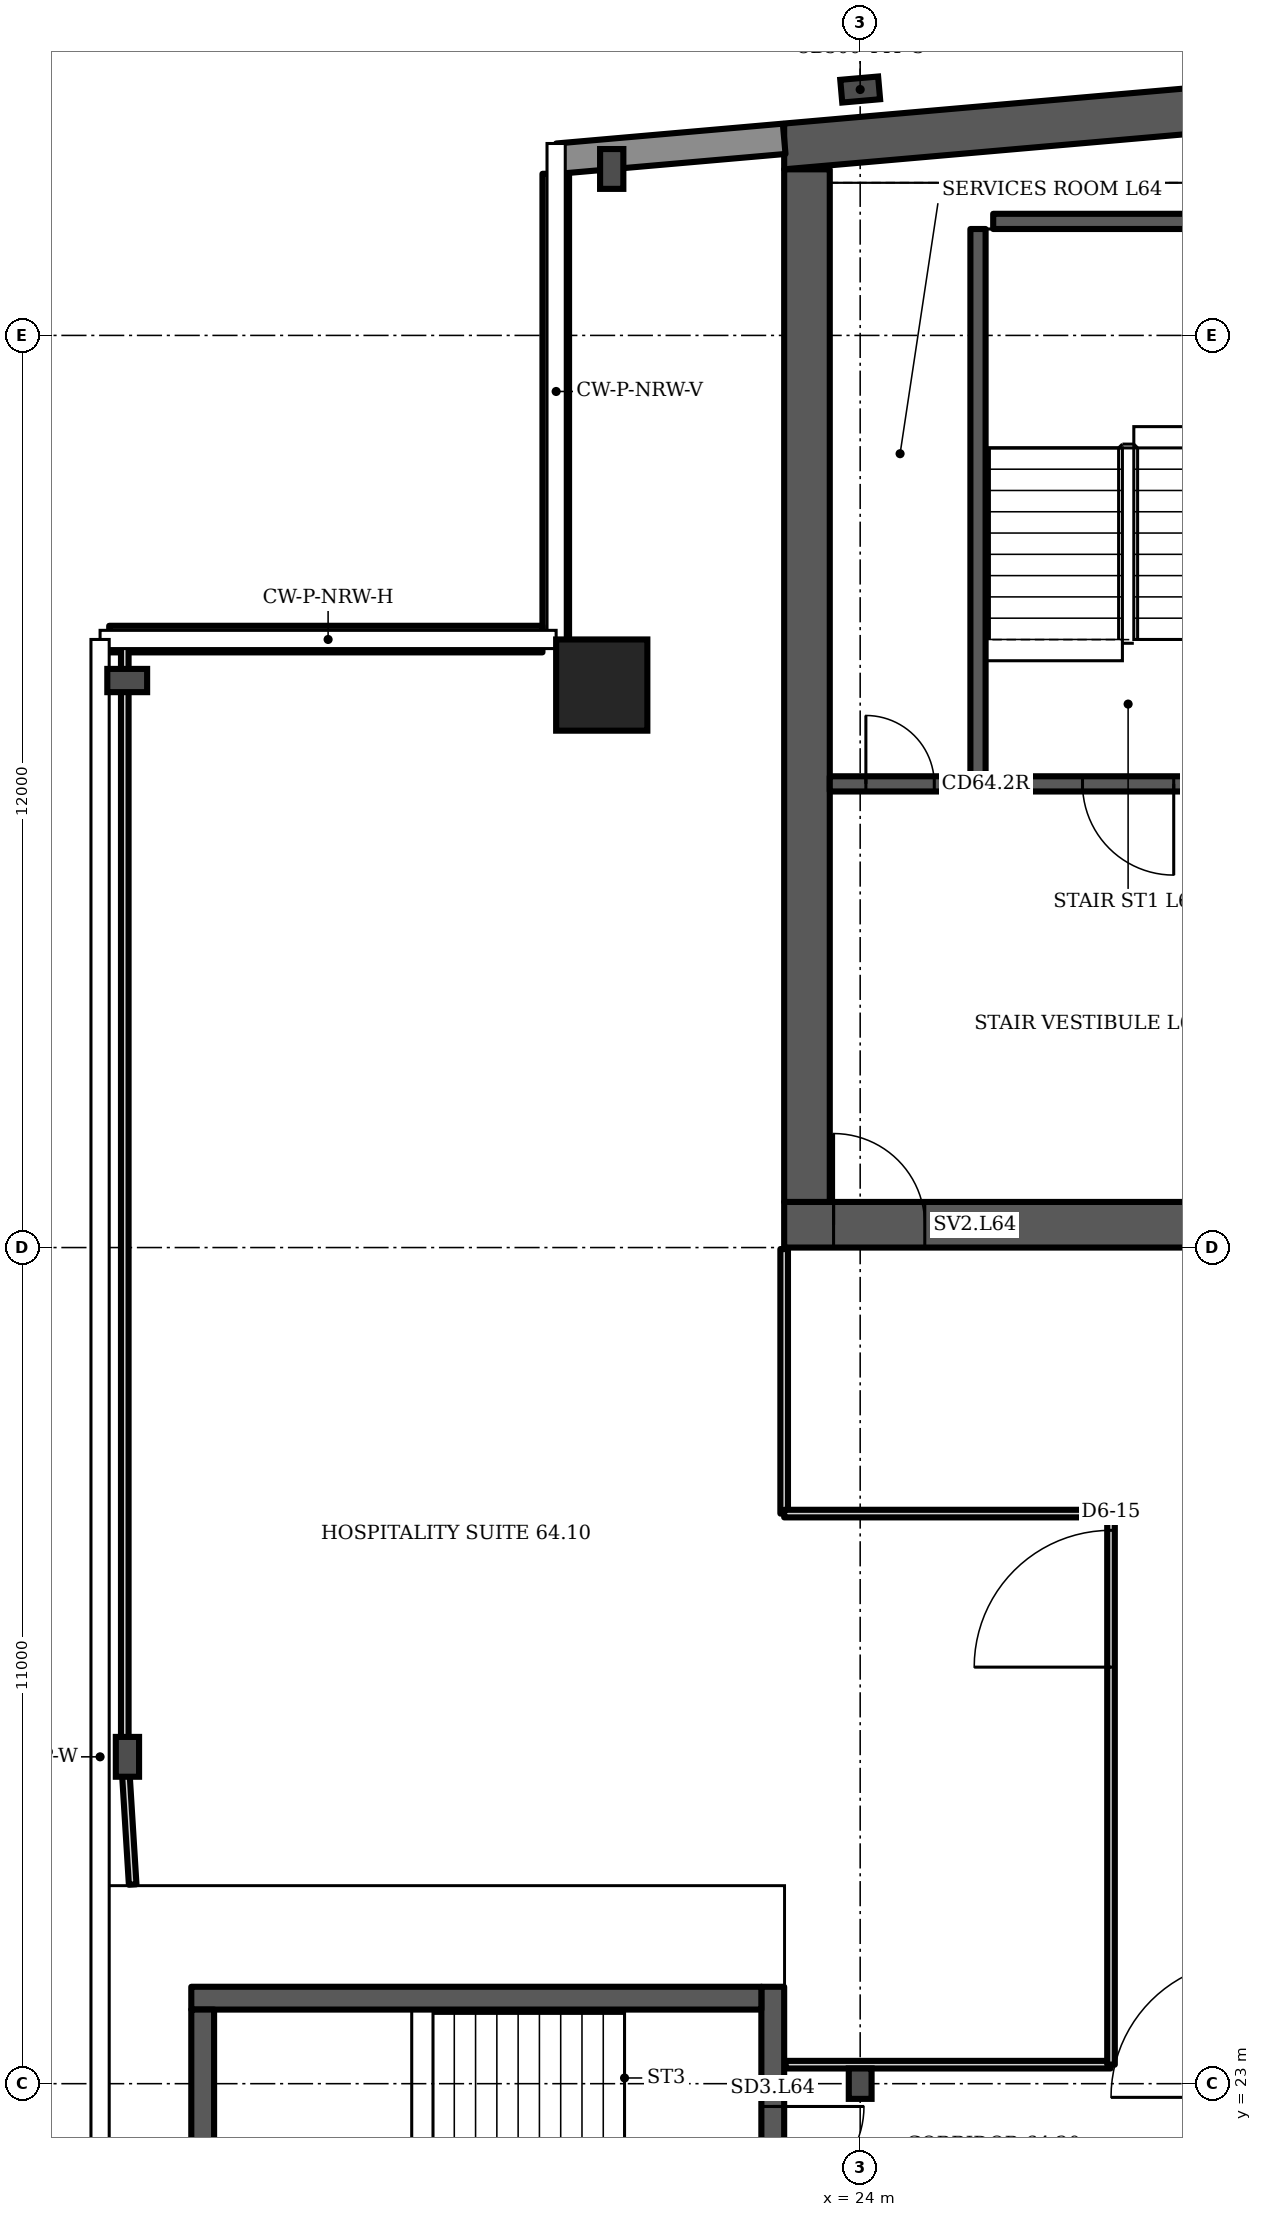
"""IFC4 building model, lengths in metres.
Left out: names, types, materials, properties, quantities, classifications, styles, units other than length and angle.
Written with IfcOpenShell. Run it as: python <this file> out.ifc"""

import sys

from ifc_helpers import new_model, si_unit, direction, frame, frame_2d, origin, origin_2d, place, context, subcontext, project, spatial, polyline, rectangle, i_section, outline, extrude, element, fill, save


model = new_model("IFC4")
c1 = context("Model", 3, precision=1e-05, world=origin(), true_north=direction((0.0, 1.0)))
c2 = subcontext(c1, "Body", "Model", "MODEL_VIEW")
j1 = project(units=[si_unit("LENGTHUNIT", "METRE"), si_unit("PLANEANGLEUNIT", "RADIAN")], contexts=[c1])
p1 = place(None, origin())
s1 = spatial("IfcSite", under=j1, at=p1, CompositionType="ELEMENT")
p2 = place(p1, origin())
s2 = spatial("IfcBuilding", under=s1, at=p2, CompositionType="ELEMENT")
p3 = place(p2, frame((0.0, 0.0, 253.9)))
s3 = spatial("IfcBuildingStorey", under=s2, at=p3, CompositionType="ELEMENT", Elevation=253.9)
p4 = place(p3, origin())
e1 = element("IfcWall", 1, at=p4, inside=s3, PredefinedType="SHEAR", context=c2, shape_type="SweptSolid", body=[
    extrude(outline(polyline([(23.0, 48.185), (40.5, 49.716), (58.0, 48.185), (58.0, 48.787), (40.5, 50.318), (23.0, 48.787), (23.0, 48.185)])), origin(), (0.0, 0.0, 1.0), 3.6),
])
p5 = place(p3, frame((23.0, 34.3, 0.0), z_axis=(0.0, 0.0, 1.0), x_axis=(1.0, 0.0, 0.0)))
e2 = element("IfcWall", 2, at=p5, inside=s3, PredefinedType="SHEAR", context=c2, shape_type="SweptSolid", body=[
    extrude(rectangle(XDim=35.0, YDim=0.6, at=frame_2d((17.5, 0.0))), origin(), (0.0, 0.0, 1.0), 3.6),
])
p6 = place(p5, frame((0.65, 0.0, 0.0)))
e3 = element("IfcOpeningElement", 3, at=p6, cuts=e2, PredefinedType="OPENING", context=c2, shape_type="SweptSolid", body=[
    extrude(rectangle(XDim=1.2, YDim=2.1, at=frame_2d((0.6, 1.05))), frame((0.0, 0.31, 0.0), z_axis=(0.0, -1.0, 0.0), x_axis=(1.0, 0.0, 0.0)), (0.0, 0.0, 1.0), 0.62),
])
p7 = place(p5, frame((7.717, 0.0, 0.0)))
e4 = element("IfcOpeningElement", 4, at=p7, cuts=e2, PredefinedType="OPENING", context=c2, shape_type="SweptSolid", body=[
    extrude(rectangle(XDim=1.1, YDim=2.1, at=frame_2d((0.55, 1.05))), frame((0.0, 0.31, 0.0), z_axis=(0.0, -1.0, 0.0), x_axis=(1.0, 0.0, 0.0)), (0.0, 0.0, 1.0), 0.62),
])
p8 = place(p5, frame((12.183, 0.0, 0.0)))
e5 = element("IfcOpeningElement", 5, at=p8, cuts=e2, PredefinedType="OPENING", context=c2, shape_type="SweptSolid", body=[
    extrude(rectangle(XDim=1.1, YDim=2.1, at=frame_2d((0.55, 1.05))), frame((0.0, 0.31, 0.0), z_axis=(0.0, -1.0, 0.0), x_axis=(1.0, 0.0, 0.0)), (0.0, 0.0, 1.0), 0.62),
])
p9 = place(p5, frame((9.8, 0.0, 0.0)))
e6 = element("IfcOpeningElement", 6, at=p9, cuts=e2, PredefinedType="OPENING", context=c2, shape_type="SweptSolid", body=[
    extrude(rectangle(XDim=1.4, YDim=2.1, at=frame_2d((0.7, 1.05))), frame((0.0, 0.31, 0.0), z_axis=(0.0, -1.0, 0.0), x_axis=(1.0, 0.0, 0.0)), (0.0, 0.0, 1.0), 0.62),
])
p10 = place(p5, frame((14.717, 0.0, 0.0)))
e7 = element("IfcOpeningElement", 7, at=p10, cuts=e2, PredefinedType="OPENING", context=c2, shape_type="SweptSolid", body=[
    extrude(rectangle(XDim=1.1, YDim=2.1, at=frame_2d((0.55, 1.05))), frame((0.0, 0.31, 0.0), z_axis=(0.0, -1.0, 0.0), x_axis=(1.0, 0.0, 0.0)), (0.0, 0.0, 1.0), 0.62),
])
p11 = place(p5, frame((16.95, 0.0, 0.0)))
e8 = element("IfcOpeningElement", 8, at=p11, cuts=e2, PredefinedType="OPENING", context=c2, shape_type="SweptSolid", body=[
    extrude(rectangle(XDim=1.1, YDim=2.1, at=frame_2d((0.55, 1.05))), frame((0.0, 0.31, 0.0), z_axis=(0.0, -1.0, 0.0), x_axis=(1.0, 0.0, 0.0)), (0.0, 0.0, 1.0), 0.62),
])
p12 = place(p5, frame((19.183, 0.0, 0.0)))
e9 = element("IfcOpeningElement", 9, at=p12, cuts=e2, PredefinedType="OPENING", context=c2, shape_type="SweptSolid", body=[
    extrude(rectangle(XDim=1.1, YDim=2.1, at=frame_2d((0.55, 1.05))), frame((0.0, 0.31, 0.0), z_axis=(0.0, -1.0, 0.0), x_axis=(1.0, 0.0, 0.0)), (0.0, 0.0, 1.0), 0.62),
])
p13 = place(p5, frame((26.15, 0.0, 0.0)))
e10 = element("IfcOpeningElement", 10, at=p13, cuts=e2, PredefinedType="OPENING", context=c2, shape_type="SweptSolid", body=[
    extrude(rectangle(XDim=1.2, YDim=2.1, at=frame_2d((0.6, 1.05))), frame((0.0, 0.31, 0.0), z_axis=(0.0, -1.0, 0.0), x_axis=(1.0, 0.0, 0.0)), (0.0, 0.0, 1.0), 0.62),
])
p14 = place(p5, frame((28.767, 0.0, 0.0)))
e11 = element("IfcOpeningElement", 11, at=p14, cuts=e2, PredefinedType="OPENING", context=c2, shape_type="SweptSolid", body=[
    extrude(rectangle(XDim=1.0, YDim=2.1, at=frame_2d((0.5, 1.05))), frame((0.0, 0.31, 0.0), z_axis=(0.0, -1.0, 0.0), x_axis=(1.0, 0.0, 0.0)), (0.0, 0.0, 1.0), 0.62),
])
p15 = place(p5, frame((33.083, 0.0, 0.0)))
e12 = element("IfcOpeningElement", 12, at=p15, cuts=e2, PredefinedType="OPENING", context=c2, shape_type="SweptSolid", body=[
    extrude(rectangle(XDim=1.0, YDim=2.1, at=frame_2d((0.5, 1.05))), frame((0.0, 0.31, 0.0), z_axis=(0.0, -1.0, 0.0), x_axis=(1.0, 0.0, 0.0)), (0.0, 0.0, 1.0), 0.62),
])
p16 = place(p5, frame((30.8, 0.0, 0.0)))
e13 = element("IfcOpeningElement", 13, at=p16, cuts=e2, PredefinedType="OPENING", context=c2, shape_type="SweptSolid", body=[
    extrude(rectangle(XDim=1.4, YDim=2.1, at=frame_2d((0.7, 1.05))), frame((0.0, 0.31, 0.0), z_axis=(0.0, -1.0, 0.0), x_axis=(1.0, 0.0, 0.0)), (0.0, 0.0, 1.0), 0.62),
])
p17 = place(p3, frame((23.3, 34.6, 0.0), z_axis=(0.0, 0.0, 1.0), x_axis=(0.0, 1.0, 0.0)))
e14 = element("IfcWall", 14, at=p17, inside=s3, PredefinedType="SHEAR", context=c2, shape_type="SweptSolid", body=[
    extrude(rectangle(XDim=13.585, YDim=0.6, at=frame_2d((6.792, 0.0))), origin(), (0.0, 0.0, 1.0), 3.6),
])
p18 = place(p3, frame((20.6, 41.4, 0.0), z_axis=(0.0, 0.0, 1.0), x_axis=(1.0, 0.0, 0.0)))
e15 = element("IfcColumn", 15, at=p18, inside=s3, PredefinedType="COLUMN", context=c2, shape_type="SweptSolid", body=[
    extrude(rectangle(XDim=1.2, YDim=1.2, at=origin_2d()), origin(), (0.0, 0.0, 1.0), 3.6),
])
for number, where, z_axis, x_axis in (
    (16, (20.731, 48.19, 0.0), (0.0, 0.0, 1.0), (-1.0, 0.0, 0.0)),
    (17, (14.357, 41.46, 0.0), (0.0, 0.0, 1.0), (0.0, 1.0, 0.0)),
    (18, (14.36, 27.3, 0.0), (0.0, 0.0, 1.0), (-1.0, 0.0, 0.0)),
):
    element("IfcColumn", number, at=place(p3, frame(where, z_axis=z_axis, x_axis=x_axis)), inside=s3, PredefinedType="COLUMN", context=c2, shape_type="SweptSolid", body=[
        extrude(i_section(OverallWidth=0.306, OverallDepth=0.524, WebThickness=0.021, FlangeThickness=0.04, FilletRadius=0.027, at=origin_2d()), origin(), (0.0, 0.0, 1.0), 3.6),
    ])
p19 = place(p3, frame((24.0, 23.0, 0.0), z_axis=(0.0, 0.0, 1.0), x_axis=(1.0, 0.0, 0.0)))
e19 = element("IfcColumn", 19, at=p19, inside=s3, PredefinedType="COLUMN", context=c2, shape_type="SweptSolid", body=[
    extrude(i_section(OverallWidth=0.3, OverallDepth=0.4, WebThickness=0.013, FlangeThickness=0.024, FilletRadius=0.027, at=origin_2d()), origin(), (0.0, 0.0, 1.0), 3.6),
])
p20 = place(p3, frame((24.0, 49.235, 0.0), z_axis=(0.0, 0.0, 1.0), x_axis=(-0.087156, 0.996197, 0.0)))
e20 = element("IfcColumn", 20, at=p20, inside=s3, PredefinedType="COLUMN", context=c2, shape_type="SweptSolid", body=[
    extrude(i_section(OverallWidth=0.3, OverallDepth=0.5, WebThickness=0.014, FlangeThickness=0.028, FilletRadius=0.027, at=origin_2d()), origin(), (0.0, 0.0, 1.0), 3.6),
])
p21 = place(p3, frame((23.0, 48.587, 0.0), z_axis=(0.0, 0.0, 1.0), x_axis=(-0.996194, -0.087168, 0.0)))
e21 = element("IfcWall", 21, at=p21, inside=s3, PredefinedType="SOLIDWALL", context=c2, shape_type="SweptSolid", body=[
    extrude(rectangle(XDim=2.994, YDim=0.4, at=frame_2d((1.497, 0.0))), origin(), (0.0, 0.0, 1.0), 3.2),
])
p22 = place(p3, frame((19.995, 48.126, 0.0), z_axis=(0.0, 0.0, 1.0), x_axis=(0.0, -1.0, 0.0)))
e22 = element("IfcWall", 22, at=p22, inside=s3, PredefinedType="SOLIDWALL", context=c2, shape_type="SweptSolid", body=[
    extrude(rectangle(XDim=6.126, YDim=0.35, at=frame_2d((3.063, 0.0))), origin(), (0.0, 0.0, 1.0), 1.0),
])
p23 = place(p3, frame((19.82, 42.005, 0.0), z_axis=(0.0, 0.0, 1.0), x_axis=(-1.0, 0.0, 0.0)))
e23 = element("IfcWall", 23, at=p23, inside=s3, PredefinedType="SOLIDWALL", context=c2, shape_type="SweptSolid", body=[
    extrude(rectangle(XDim=5.7, YDim=0.35, at=frame_2d((2.85, 0.0))), origin(), (0.0, 0.0, 1.0), 1.0),
])
p24 = place(p3, frame((23.6, 40.1, 0.0), z_axis=(0.0, 0.0, 1.0), x_axis=(1.0, 0.0, 0.0)))
e24 = element("IfcWall", 24, at=p24, inside=s3, PredefinedType="SHEAR", context=c2, shape_type="SweptSolid", body=[
    extrude(rectangle(XDim=6.1, YDim=0.2, at=frame_2d((3.05, 0.0))), origin(), (0.0, 0.0, 1.0), 3.2),
])
p25 = place(p24, frame((3.325, 0.0, 0.0)))
e25 = element("IfcOpeningElement", 25, at=p25, cuts=e24, PredefinedType="OPENING", context=c2, shape_type="SweptSolid", body=[
    extrude(rectangle(XDim=1.2, YDim=2.1, at=frame_2d((0.6, 1.05))), frame((0.0, 0.11, 0.0), z_axis=(0.0, -1.0, 0.0), x_axis=(1.0, 0.0, 0.0)), (0.0, 0.0, 1.0), 0.22),
])
p26 = place(p24, frame((0.475, 0.0, 0.0)))
e26 = element("IfcOpeningElement", 26, at=p26, cuts=e24, PredefinedType="OPENING", context=c2, shape_type="SweptSolid", body=[
    extrude(rectangle(XDim=0.9, YDim=2.1, at=frame_2d((0.45, 1.05))), frame((0.0, 0.11, 0.0), z_axis=(0.0, -1.0, 0.0), x_axis=(1.0, 0.0, 0.0)), (0.0, 0.0, 1.0), 0.22),
])
p27 = place(p3, frame((25.55, 40.2, 0.0), z_axis=(0.0, 0.0, 1.0), x_axis=(0.0, 1.0, 0.0)))
e27 = element("IfcWall", 27, at=p27, inside=s3, PredefinedType="SHEAR", context=c2, shape_type="SweptSolid", body=[
    extrude(rectangle(XDim=7.2, YDim=0.2, at=frame_2d((3.6, 0.0))), origin(), (0.0, 0.0, 1.0), 3.2),
])
p28 = place(p3, frame((25.75, 47.5, 0.0), z_axis=(0.0, 0.0, 1.0), x_axis=(1.0, 0.0, 0.0)))
e28 = element("IfcWall", 28, at=p28, inside=s3, PredefinedType="SHEAR", context=c2, shape_type="SweptSolid", body=[
    extrude(rectangle(XDim=3.95, YDim=0.2, at=frame_2d((1.975, 0.0))), origin(), (0.0, 0.0, 1.0), 3.2),
])
p29 = place(p3, frame((22.85, 19.925, 0.0), z_axis=(0.0, 0.0, 1.0), x_axis=(0.0, 1.0, 0.0)))
e29 = element("IfcWall", 29, at=p29, inside=s3, PredefinedType="SHEAR", context=c2, shape_type="SweptSolid", body=[
    extrude(rectangle(XDim=4.35, YDim=0.3, at=frame_2d((2.175, 0.0))), origin(), (0.0, 0.0, 1.0), 3.2),
])
p30 = place(p29, frame((1.575, 0.0, 0.0)))
e30 = element("IfcOpeningElement", 30, at=p30, cuts=e29, PredefinedType="OPENING", context=c2, shape_type="SweptSolid", body=[
    extrude(rectangle(XDim=1.2, YDim=2.1, at=frame_2d((0.6, 1.05))), frame((0.0, 0.16, 0.0), z_axis=(0.0, -1.0, 0.0), x_axis=(1.0, 0.0, 0.0)), (0.0, 0.0, 1.0), 0.32),
])
p31 = place(p3, frame((14.325, 27.3, 0.0), z_axis=(0.0, 0.0, 1.0), x_axis=(0.0, 1.0, 0.0)))
e31 = element("IfcWall", 31, at=p31, inside=s3, PredefinedType="PARTITIONING", context=c2, shape_type="SweptSolid", body=[
    extrude(rectangle(XDim=14.68, YDim=0.1, at=frame_2d((7.34, 0.0))), origin(), (0.0, 0.0, 1.0), 2.58),
])
p32 = place(p3, frame((14.429, 25.62, 0.0), z_axis=(0.0, 0.0, 1.0), x_axis=(-0.061647, 0.998101, 0.0)))
e32 = element("IfcWall", 32, at=p32, inside=s3, PredefinedType="PARTITIONING", context=c2, shape_type="SweptSolid", body=[
    extrude(rectangle(XDim=1.683, YDim=0.1, at=frame_2d((0.842, 0.0))), origin(), (0.0, 0.0, 1.0), 2.58),
])
p33 = place(p3, frame((23.0, 30.5, 0.0), z_axis=(0.0, 0.0, 1.0), x_axis=(0.0, 1.0, 0.0)))
e33 = element("IfcWall", 33, at=p33, inside=s3, PredefinedType="PARTITIONING", context=c2, shape_type="SweptSolid", body=[
    extrude(rectangle(XDim=3.48, YDim=0.1, at=frame_2d((1.74, 0.0))), origin(), (0.0, 0.0, 1.0), 3.2),
])
p34 = place(p3, frame((23.0, 30.5, 0.0), z_axis=(0.0, 0.0, 1.0), x_axis=(1.0, 0.0, 0.0)))
e34 = element("IfcWall", 34, at=p34, inside=s3, PredefinedType="PARTITIONING", context=c2, shape_type="SweptSolid", body=[
    extrude(rectangle(XDim=4.3, YDim=0.1, at=frame_2d((2.15, 0.0))), origin(), (0.0, 0.0, 1.0), 3.2),
])
p35 = place(p3, frame((23.02, 23.25, 0.0), z_axis=(0.0, 0.0, 1.0), x_axis=(1.0, 0.0, 0.0)))
e35 = element("IfcWall", 35, at=p35, inside=s3, PredefinedType="PARTITIONING", context=c2, shape_type="SweptSolid", body=[
    extrude(rectangle(XDim=4.275, YDim=0.1, at=frame_2d((2.137, 0.0))), origin(), (0.0, 0.0, 1.0), 3.2),
])
p36 = place(p3, frame((27.3, 23.25, 0.0), z_axis=(0.0, 0.0, 1.0), x_axis=(0.0, 1.0, 0.0)))
e36 = element("IfcWall", 36, at=p36, inside=s3, PredefinedType="PARTITIONING", context=c2, shape_type="SweptSolid", body=[
    extrude(rectangle(XDim=7.25, YDim=0.1, at=frame_2d((3.625, 0.0))), origin(), (0.0, 0.0, 1.0), 3.2),
])
p37 = place(p36, frame((5.23, 0.0, 0.0)))
e37 = element("IfcOpeningElement", 37, at=p37, cuts=e36, PredefinedType="OPENING", context=c2, shape_type="SweptSolid", body=[
    extrude(rectangle(XDim=1.8, YDim=2.1, at=frame_2d((0.9, 1.05))), frame((0.0, 0.06, 0.0), z_axis=(0.0, -1.0, 0.0), x_axis=(1.0, 0.0, 0.0)), (0.0, 0.0, 1.0), 0.12),
])
p38 = place(p3, frame((15.2, 24.125, 0.0), z_axis=(0.0, 0.0, 1.0), x_axis=(1.0, 0.0, 0.0)))
e38 = element("IfcWall", 38, at=p38, inside=s3, PredefinedType="SHEAR", context=c2, shape_type="SweptSolid", body=[
    extrude(rectangle(XDim=7.5, YDim=0.3, at=frame_2d((3.75, 0.0))), origin(), (0.0, 0.0, 1.0), 3.2),
])
p39 = place(p3, frame((15.35, 20.225, 0.0), z_axis=(0.0, 0.0, 1.0), x_axis=(0.0, 1.0, 0.0)))
e39 = element("IfcWall", 39, at=p39, inside=s3, PredefinedType="SHEAR", context=c2, shape_type="SweptSolid", body=[
    extrude(rectangle(XDim=3.75, YDim=0.3, at=frame_2d((1.875, 0.0))), origin(), (0.0, 0.0, 1.0), 3.2),
])
p40 = place(p25, origin())
e40 = element("IfcDoor", 40, at=p40, inside=s3, OperationType="SINGLE_SWING_RIGHT", PredefinedType="DOOR", context=c2, shape_type="SweptSolid", body=[
    extrude(rectangle(XDim=1.2, YDim=2.1, at=frame_2d((0.6, 1.05))), frame((0.0, 0.025, 0.0), z_axis=(0.0, -1.0, 0.0), x_axis=(1.0, 0.0, 0.0)), (0.0, 0.0, 1.0), 0.05),
])
fill(e25, e40)
p41 = place(p26, origin())
e41 = element("IfcDoor", 41, at=p41, inside=s3, OperationType="SINGLE_SWING_LEFT", PredefinedType="DOOR", context=c2, shape_type="SweptSolid", body=[
    extrude(rectangle(XDim=0.9, YDim=2.1, at=frame_2d((0.45, 1.05))), frame((0.0, 0.025, 0.0), z_axis=(0.0, -1.0, 0.0), x_axis=(1.0, 0.0, 0.0)), (0.0, 0.0, 1.0), 0.05),
])
fill(e26, e41)
p42 = place(p6, origin())
e42 = element("IfcDoor", 42, at=p42, inside=s3, OperationType="SINGLE_SWING_LEFT", PredefinedType="DOOR", context=c2, shape_type="SweptSolid", body=[
    extrude(rectangle(XDim=1.2, YDim=2.1, at=frame_2d((0.6, 1.05))), frame((0.0, 0.025, 0.0), z_axis=(0.0, -1.0, 0.0), x_axis=(1.0, 0.0, 0.0)), (0.0, 0.0, 1.0), 0.05),
])
fill(e3, e42)
p43 = place(p30, origin())
e43 = element("IfcDoor", 43, at=p43, inside=s3, OperationType="SINGLE_SWING_RIGHT", PredefinedType="DOOR", context=c2, shape_type="SweptSolid", body=[
    extrude(rectangle(XDim=1.2, YDim=2.1, at=frame_2d((0.6, 1.05))), frame((0.0, 0.025, 0.0), z_axis=(0.0, -1.0, 0.0), x_axis=(1.0, 0.0, 0.0)), (0.0, 0.0, 1.0), 0.05),
])
fill(e30, e43)
p44 = place(p37, origin())
e44 = element("IfcDoor", 44, at=p44, inside=s3, OperationType="DOUBLE_DOOR_SINGLE_SWING", PredefinedType="DOOR", context=c2, shape_type="SweptSolid", body=[
    extrude(rectangle(XDim=1.8, YDim=2.1, at=frame_2d((0.9, 1.05))), frame((0.0, 0.025, 0.0), z_axis=(0.0, -1.0, 0.0), x_axis=(1.0, 0.0, 0.0)), (0.0, 0.0, 1.0), 0.05),
])
fill(e37, e44)
save(model, sys.argv[1])
